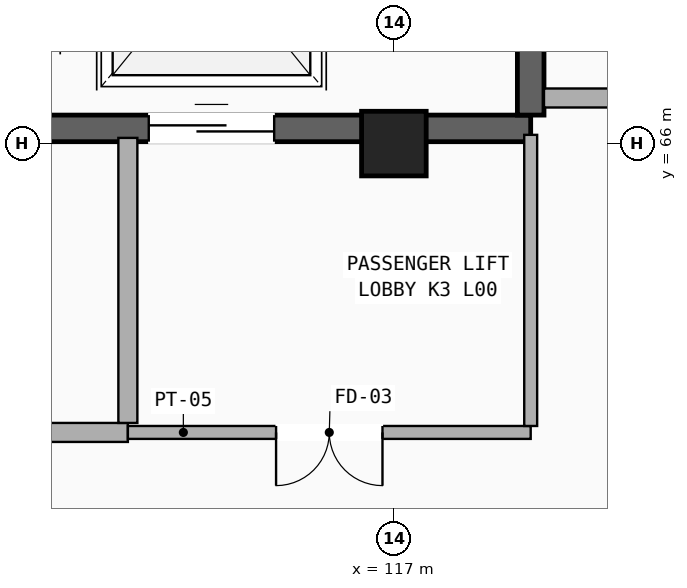
"""IFC4 building model, lengths in metres.
Left out: names, types, materials, properties, quantities, classifications, styles, units other than length and angle.
Written with IfcOpenShell. Run it as: python <this file> out.ifc"""

import sys

from ifc_helpers import new_model, si_unit, direction, frame, frame_2d, origin, origin_2d, place, context, subcontext, project, spatial, rectangle, extrude, element, fill, save


model = new_model("IFC4")
c1 = context("Model", 3, precision=1e-05, world=origin(), true_north=direction((0.0, 1.0)))
c2 = subcontext(c1, "Body", "Model", "MODEL_VIEW")
j1 = project(units=[si_unit("LENGTHUNIT", "METRE"), si_unit("PLANEANGLEUNIT", "RADIAN")], contexts=[c1])
p1 = place(None, origin())
s1 = spatial("IfcSite", under=j1, at=p1, CompositionType="ELEMENT")
p2 = place(p1, origin())
s2 = spatial("IfcBuilding", under=s1, at=p2, CompositionType="ELEMENT")
p3 = place(p2, origin())
s3 = spatial("IfcBuildingStorey", under=s2, at=p3, CompositionType="ELEMENT", Elevation=0.0)
p4 = place(p3, frame((117.0, 66.0, 0.0), z_axis=(0.0, 0.0, 1.0), x_axis=(1.0, 0.0, 0.0)))
e1 = element("IfcColumn", 1, at=p4, inside=s3, PredefinedType="COLUMN", context=c2, shape_type="SweptSolid", body=[
    extrude(rectangle(XDim=0.85, YDim=0.85, at=origin_2d()), origin(), (0.0, 0.0, 1.0), 5.1),
])
p5 = place(p3, frame((108.5, 66.2, 0.0), z_axis=(0.0, 0.0, 1.0), x_axis=(1.0, 0.0, 0.0)))
e2 = element("IfcWall", 2, at=p5, inside=s3, PredefinedType="SHEAR", context=c2, shape_type="SweptSolid", body=[
    extrude(rectangle(XDim=10.3, YDim=0.35, at=frame_2d((5.15, 0.0))), origin(), (0.0, 0.0, 1.0), 5.1),
])
p6 = place(p5, frame((0.45, 0.0, 0.0)))
e3 = element("IfcOpeningElement", 3, at=p6, cuts=e2, PredefinedType="OPENING", context=c2, shape_type="SweptSolid", body=[
    extrude(rectangle(XDim=1.1, YDim=2.2, at=frame_2d((0.55, 1.1))), frame((0.0, 0.185, 0.0), z_axis=(0.0, -1.0, 0.0), x_axis=(1.0, 0.0, 0.0)), (0.0, 0.0, 1.0), 0.37),
])
p7 = place(p5, frame((2.09, 0.0, 0.0)))
e4 = element("IfcOpeningElement", 4, at=p7, cuts=e2, PredefinedType="OPENING", context=c2, shape_type="SweptSolid", body=[
    extrude(rectangle(XDim=1.22, YDim=2.2, at=frame_2d((0.61, 1.1))), frame((0.0, 0.185, 0.0), z_axis=(0.0, -1.0, 0.0), x_axis=(1.0, 0.0, 0.0)), (0.0, 0.0, 1.0), 0.37),
])
p8 = place(p5, frame((5.275, 0.0, 0.0)))
e5 = element("IfcOpeningElement", 5, at=p8, cuts=e2, PredefinedType="OPENING", context=c2, shape_type="SweptSolid", body=[
    extrude(rectangle(XDim=1.65, YDim=2.34, at=frame_2d((0.825, 1.17))), frame((0.0, 0.185, 0.0), z_axis=(0.0, -1.0, 0.0), x_axis=(1.0, 0.0, 0.0)), (0.0, 0.0, 1.0), 0.37),
])
p9 = place(p3, frame((118.8, 66.375, 0.0), z_axis=(0.0, 0.0, 1.0), x_axis=(0.0, 1.0, 0.0)))
e6 = element("IfcWall", 6, at=p9, inside=s3, PredefinedType="SHEAR", context=c2, shape_type="SweptSolid", body=[
    extrude(rectangle(XDim=8.25, YDim=0.35, at=frame_2d((4.125, 0.0))), origin(), (0.0, 0.0, 1.0), 5.1),
])
p10 = place(p3, frame((108.5, 62.2, 0.0), z_axis=(0.0, 0.0, 1.0), x_axis=(1.0, 0.0, 0.0)))
e7 = element("IfcWall", 7, at=p10, inside=s3, PredefinedType="PARTITIONING", context=c2, shape_type="SweptSolid", body=[
    extrude(rectangle(XDim=5.0, YDim=0.25, at=frame_2d((2.5, 0.0))), origin(), (0.0, 0.0, 1.0), 4.85),
])
p11 = place(p10, frame((1.95, 0.0, 0.0)))
e8 = element("IfcOpeningElement", 8, at=p11, cuts=e7, PredefinedType="OPENING", context=c2, shape_type="SweptSolid", body=[
    extrude(rectangle(XDim=1.1, YDim=2.2, at=frame_2d((0.55, 1.1))), frame((0.0, 0.135, 0.0), z_axis=(0.0, -1.0, 0.0), x_axis=(1.0, 0.0, 0.0)), (0.0, 0.0, 1.0), 0.27),
])
p12 = place(p3, frame((113.5, 62.325, 0.0), z_axis=(0.0, 0.0, 1.0), x_axis=(0.0, 1.0, 0.0)))
e9 = element("IfcWall", 9, at=p12, inside=s3, PredefinedType="PARTITIONING", context=c2, shape_type="SweptSolid", body=[
    extrude(rectangle(XDim=3.75, YDim=0.25, at=frame_2d((1.875, 0.0))), origin(), (0.0, 0.0, 1.0), 3.98),
])
p13 = place(p3, frame((113.5, 62.2, 0.0), z_axis=(0.0, 0.0, 1.0), x_axis=(1.0, 0.0, 0.0)))
e10 = element("IfcWall", 10, at=p13, inside=s3, PredefinedType="PARTITIONING", context=c2, shape_type="SweptSolid", body=[
    extrude(rectangle(XDim=5.3, YDim=0.17, at=frame_2d((2.65, 0.0))), origin(), (0.0, 0.0, 1.0), 4.85),
])
p14 = place(p13, frame((1.95, 0.0, 0.0)))
e11 = element("IfcOpeningElement", 11, at=p14, cuts=e10, PredefinedType="OPENING", context=c2, shape_type="SweptSolid", body=[
    extrude(rectangle(XDim=1.4, YDim=2.2, at=frame_2d((0.7, 1.1))), frame((0.0, 0.095, 0.0), z_axis=(0.0, -1.0, 0.0), x_axis=(1.0, 0.0, 0.0)), (0.0, 0.0, 1.0), 0.19),
])
p15 = place(p3, frame((118.8, 62.285, 0.0), z_axis=(0.0, 0.0, 1.0), x_axis=(0.0, 1.0, 0.0)))
e12 = element("IfcWall", 12, at=p15, inside=s3, PredefinedType="PARTITIONING", context=c2, shape_type="SweptSolid", body=[
    extrude(rectangle(XDim=3.83, YDim=0.17, at=frame_2d((1.915, 0.0))), origin(), (0.0, 0.0, 1.0), 3.83),
])
p16 = place(p3, frame((118.975, 66.6, 0.0), z_axis=(0.0, 0.0, 1.0), x_axis=(1.0, 0.0, 0.0)))
e13 = element("IfcWall", 13, at=p16, inside=s3, PredefinedType="PARTITIONING", context=c2, shape_type="SweptSolid", body=[
    extrude(rectangle(XDim=15.225, YDim=0.25, at=frame_2d((7.612, 0.0))), origin(), (0.0, 0.0, 1.0), 3.98),
])
p17 = place(p16, frame((9.544, 0.0, 0.0)))
e14 = element("IfcOpeningElement", 14, at=p17, cuts=e13, PredefinedType="OPENING", context=c2, shape_type="SweptSolid", body=[
    extrude(rectangle(XDim=1.8, YDim=2.3, at=frame_2d((0.9, 1.15))), frame((0.0, 0.135, 0.0), z_axis=(0.0, -1.0, 0.0), x_axis=(1.0, 0.0, 0.0)), (0.0, 0.0, 1.0), 0.27),
])
p18 = place(p8, origin())
e15 = element("IfcDoor", 15, at=p18, inside=s3, OperationType="SLIDING_TO_LEFT", PredefinedType="DOOR", context=c2, shape_type="SweptSolid", body=[
    extrude(rectangle(XDim=1.65, YDim=2.34, at=frame_2d((0.825, 1.17))), frame((0.0, 0.025, 0.0), z_axis=(0.0, -1.0, 0.0), x_axis=(1.0, 0.0, 0.0)), (0.0, 0.0, 1.0), 0.05),
])
fill(e5, e15)
p19 = place(p14, frame((1.4, 0.0, 0.0), z_axis=(0.0, 0.0, 1.0), x_axis=(-1.0, 0.0, 0.0)))
e16 = element("IfcDoor", 16, at=p19, inside=s3, OperationType="DOUBLE_DOOR_SINGLE_SWING", PredefinedType="DOOR", context=c2, shape_type="SweptSolid", body=[
    extrude(rectangle(XDim=1.4, YDim=2.2, at=frame_2d((0.7, 1.1))), frame((0.0, 0.025, 0.0), z_axis=(0.0, -1.0, 0.0), x_axis=(1.0, 0.0, 0.0)), (0.0, 0.0, 1.0), 0.05),
])
fill(e11, e16)
save(model, sys.argv[1])
